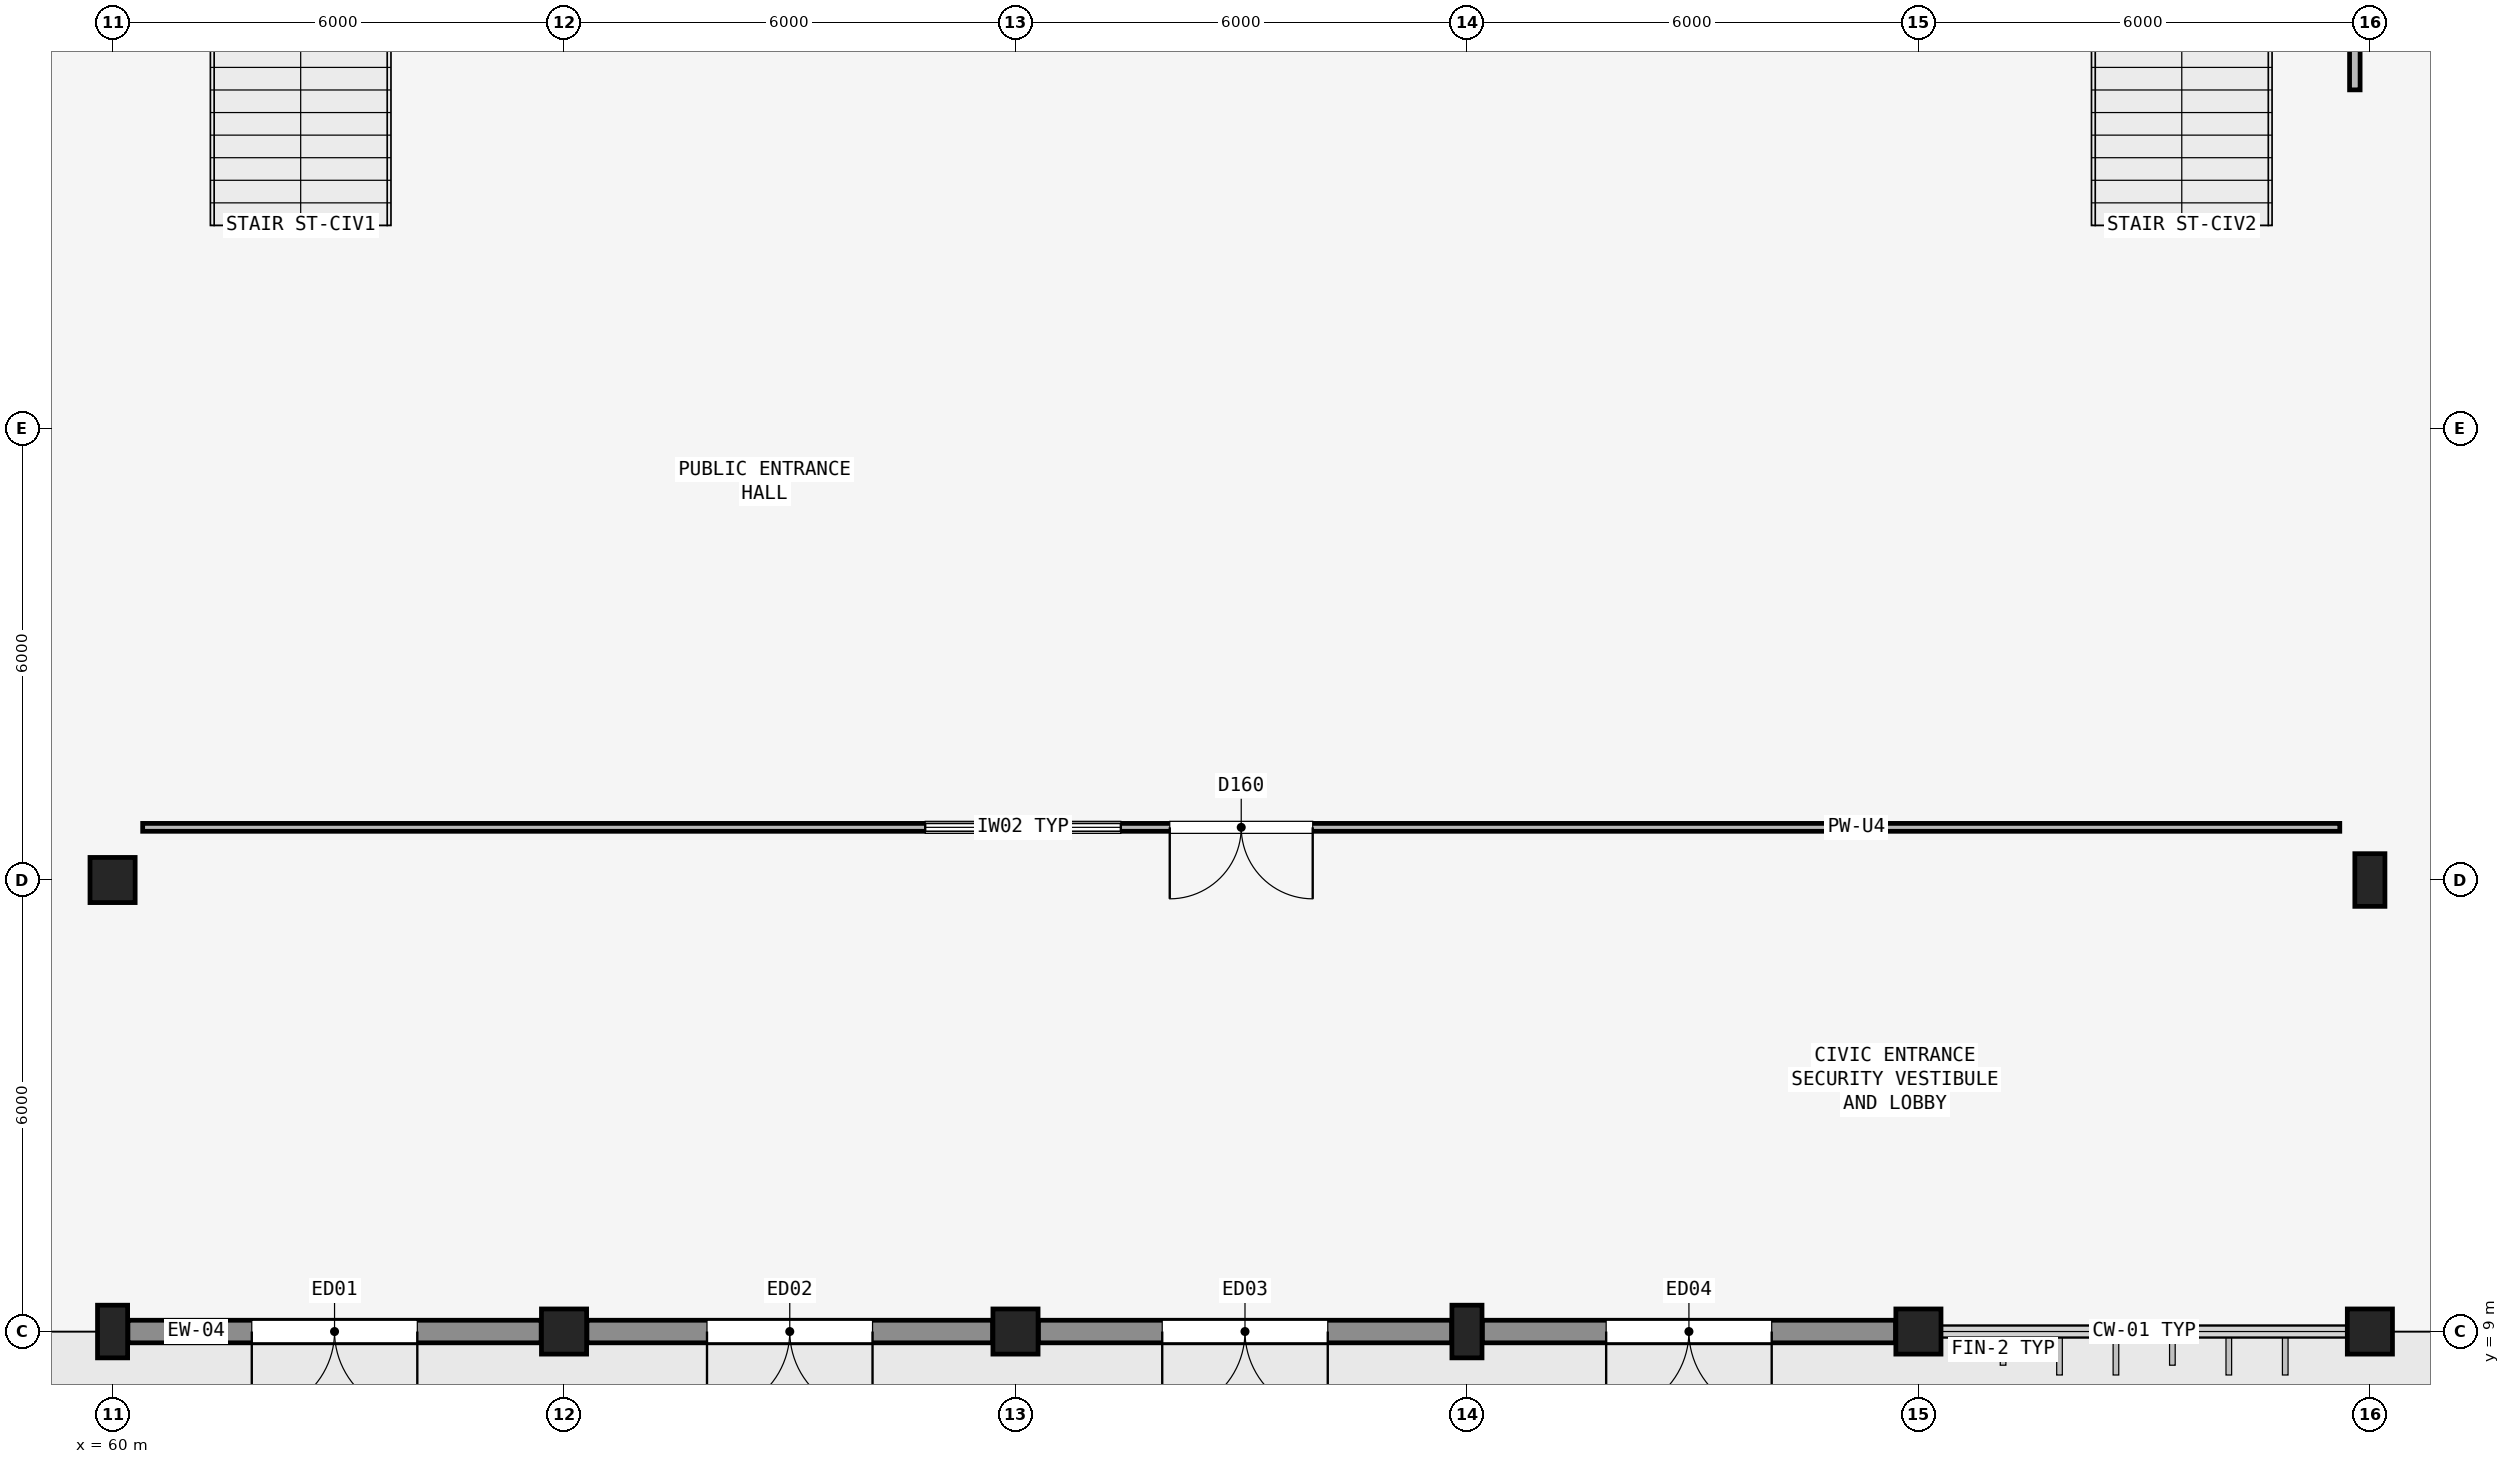
"""IFC4 building model, lengths in metres.
Left out: names, types, materials, properties, quantities, classifications, styles, units other than length and angle.
Written with IfcOpenShell. Run it as: python <this file> out.ifc"""

import sys

from ifc_helpers import new_model, si_unit, direction, frame, frame_2d, origin, origin_2d, place, context, subcontext, project, spatial, rectangle, extrude, element, fill, save


model = new_model("IFC4")
c1 = context("Model", 3, precision=1e-05, world=origin(), true_north=direction((0.0, 1.0)))
c2 = subcontext(c1, "Body", "Model", "MODEL_VIEW")
j1 = project(units=[si_unit("LENGTHUNIT", "METRE"), si_unit("PLANEANGLEUNIT", "RADIAN")], contexts=[c1])
p1 = place(None, origin())
s1 = spatial("IfcSite", under=j1, at=p1, CompositionType="ELEMENT")
p2 = place(p1, origin())
s2 = spatial("IfcBuilding", under=s1, at=p2, CompositionType="ELEMENT")
p3 = place(p2, origin())
s3 = spatial("IfcBuildingStorey", under=s2, at=p3, CompositionType="ELEMENT", Elevation=0.0)
p4 = place(p3, frame((60.0, 9.0, 0.0), z_axis=(0.0, 0.0, 1.0), x_axis=(1.0, 0.0, 0.0)))
e1 = element("IfcColumn", 1, at=p4, inside=s3, PredefinedType="COLUMN", context=c2, shape_type="SweptSolid", body=[
    extrude(rectangle(XDim=0.4, YDim=0.7, at=origin_2d()), origin(), (0.0, 0.0, 1.0), 4.8),
])
for number, where, z_axis, x_axis in (
    (2, (60.0, 15.0, 0.0), (0.0, 0.0, 1.0), (1.0, 0.0, 0.0)),
    (3, (66.0, 9.0, 0.0), (0.0, 0.0, 1.0), (1.0, 0.0, 0.0)),
    (4, (72.0, 9.0, 0.0), (0.0, 0.0, 1.0), (1.0, 0.0, 0.0)),
):
    element("IfcColumn", number, at=place(p3, frame(where, z_axis=z_axis, x_axis=x_axis)), inside=s3, PredefinedType="COLUMN", context=c2, shape_type="SweptSolid", body=[
        extrude(rectangle(XDim=0.6, YDim=0.6, at=origin_2d()), origin(), (0.0, 0.0, 1.0), 4.8),
    ])
p5 = place(p3, frame((78.0, 9.0, 0.0), z_axis=(0.0, 0.0, 1.0), x_axis=(1.0, 0.0, 0.0)))
e5 = element("IfcColumn", 5, at=p5, inside=s3, PredefinedType="COLUMN", context=c2, shape_type="SweptSolid", body=[
    extrude(rectangle(XDim=0.4, YDim=0.7, at=origin_2d()), origin(), (0.0, 0.0, 1.0), 4.8),
])
for number, where, z_axis, x_axis in (
    (6, (84.0, 9.0, 0.0), (0.0, 0.0, 1.0), (1.0, 0.0, 0.0)),
    (7, (90.0, 9.0, 0.0), (0.0, 0.0, 1.0), (1.0, 0.0, 0.0)),
):
    element("IfcColumn", number, at=place(p3, frame(where, z_axis=z_axis, x_axis=x_axis)), inside=s3, PredefinedType="COLUMN", context=c2, shape_type="SweptSolid", body=[
        extrude(rectangle(XDim=0.6, YDim=0.6, at=origin_2d()), origin(), (0.0, 0.0, 1.0), 4.8),
    ])
p6 = place(p3, frame((90.0, 15.0, 0.0), z_axis=(0.0, 0.0, 1.0), x_axis=(1.0, 0.0, 0.0)))
e8 = element("IfcColumn", 8, at=p6, inside=s3, PredefinedType="COLUMN", context=c2, shape_type="SweptSolid", body=[
    extrude(rectangle(XDim=0.4, YDim=0.7, at=origin_2d()), origin(), (0.0, 0.0, 1.0), 4.8),
])
p7 = place(p3, frame((60.204, 9.0, 0.0), z_axis=(0.0, 0.0, 1.0), x_axis=(1.0, 0.0, 0.0)))
e9 = element("IfcWall", 9, at=p7, inside=s3, PredefinedType="SOLIDWALL", context=c2, shape_type="SweptSolid", body=[
    extrude(rectangle(XDim=5.492, YDim=0.3, at=frame_2d((2.746, 0.0))), origin(), (0.0, 0.0, 1.0), 2.94),
])
p8 = place(p7, frame((1.646, 0.0, 0.0)))
e10 = element("IfcOpeningElement", 10, at=p8, cuts=e9, PredefinedType="OPENING", context=c2, shape_type="SweptSolid", body=[
    extrude(rectangle(XDim=2.2, YDim=2.5, at=frame_2d((1.1, 1.25))), frame((0.0, 0.16, 0.0), z_axis=(0.0, -1.0, 0.0), x_axis=(1.0, 0.0, 0.0)), (0.0, 0.0, 1.0), 0.32),
])
p9 = place(p3, frame((66.304, 9.0, 0.0), z_axis=(0.0, 0.0, 1.0), x_axis=(1.0, 0.0, 0.0)))
e11 = element("IfcWall", 11, at=p9, inside=s3, PredefinedType="SOLIDWALL", context=c2, shape_type="SweptSolid", body=[
    extrude(rectangle(XDim=5.392, YDim=0.3, at=frame_2d((2.696, 0.0))), origin(), (0.0, 0.0, 1.0), 2.99),
])
p10 = place(p9, frame((1.596, 0.0, 0.0)))
e12 = element("IfcOpeningElement", 12, at=p10, cuts=e11, PredefinedType="OPENING", context=c2, shape_type="SweptSolid", body=[
    extrude(rectangle(XDim=2.2, YDim=2.5, at=frame_2d((1.1, 1.25))), frame((0.0, 0.16, 0.0), z_axis=(0.0, -1.0, 0.0), x_axis=(1.0, 0.0, 0.0)), (0.0, 0.0, 1.0), 0.32),
])
p11 = place(p3, frame((72.304, 9.0, 0.0), z_axis=(0.0, 0.0, 1.0), x_axis=(1.0, 0.0, 0.0)))
e13 = element("IfcWall", 13, at=p11, inside=s3, PredefinedType="SOLIDWALL", context=c2, shape_type="SweptSolid", body=[
    extrude(rectangle(XDim=5.492, YDim=0.3, at=frame_2d((2.746, 0.0))), origin(), (0.0, 0.0, 1.0), 2.94),
])
p12 = place(p11, frame((1.646, 0.0, 0.0)))
e14 = element("IfcOpeningElement", 14, at=p12, cuts=e13, PredefinedType="OPENING", context=c2, shape_type="SweptSolid", body=[
    extrude(rectangle(XDim=2.2, YDim=2.5, at=frame_2d((1.1, 1.25))), frame((0.0, 0.16, 0.0), z_axis=(0.0, -1.0, 0.0), x_axis=(1.0, 0.0, 0.0)), (0.0, 0.0, 1.0), 0.32),
])
p13 = place(p3, frame((78.204, 9.0, 0.0), z_axis=(0.0, 0.0, 1.0), x_axis=(1.0, 0.0, 0.0)))
e15 = element("IfcWall", 15, at=p13, inside=s3, PredefinedType="SOLIDWALL", context=c2, shape_type="SweptSolid", body=[
    extrude(rectangle(XDim=5.492, YDim=0.3, at=frame_2d((2.746, 0.0))), origin(), (0.0, 0.0, 1.0), 2.94),
])
p14 = place(p13, frame((1.646, 0.0, 0.0)))
e16 = element("IfcOpeningElement", 16, at=p14, cuts=e15, PredefinedType="OPENING", context=c2, shape_type="SweptSolid", body=[
    extrude(rectangle(XDim=2.2, YDim=2.5, at=frame_2d((1.1, 1.25))), frame((0.0, 0.16, 0.0), z_axis=(0.0, -1.0, 0.0), x_axis=(1.0, 0.0, 0.0)), (0.0, 0.0, 1.0), 0.32),
])
p15 = place(p3, frame((89.6, 15.7, 0.0), z_axis=(0.0, 0.0, 1.0), x_axis=(-1.0, 0.0, 0.0)))
e17 = element("IfcWall", 17, at=p15, inside=s3, PredefinedType="PARTITIONING", context=c2, shape_type="SweptSolid", body=[
    extrude(rectangle(XDim=29.2, YDim=0.105, at=frame_2d((14.6, 0.0))), origin(), (0.0, 0.0, 1.0), 4.49),
])
p16 = place(p15, frame((13.65, 0.0, 0.0)))
e18 = element("IfcOpeningElement", 18, at=p16, cuts=e17, PredefinedType="OPENING", context=c2, shape_type="SweptSolid", body=[
    extrude(rectangle(XDim=1.9, YDim=2.3, at=frame_2d((0.95, 1.15))), frame((0.0, 0.062, 0.0), z_axis=(0.0, -1.0, 0.0), x_axis=(1.0, 0.0, 0.0)), (0.0, 0.0, 1.0), 0.125),
])
p17 = place(p15, frame((16.2, 0.0, 1.0)))
e19 = element("IfcOpeningElement", 19, at=p17, cuts=e17, PredefinedType="OPENING", context=c2, shape_type="SweptSolid", body=[
    extrude(rectangle(XDim=2.6, YDim=1.2, at=frame_2d((1.3, 0.6))), frame((0.0, 0.062, 0.0), z_axis=(0.0, -1.0, 0.0), x_axis=(1.0, 0.0, 0.0)), (0.0, 0.0, 1.0), 0.125),
])
p18 = place(p3, frame((89.8, 38.4, 0.0), z_axis=(0.0, 0.0, 1.0), x_axis=(0.0, -1.0, 0.0)))
e20 = element("IfcWall", 20, at=p18, inside=s3, PredefinedType="PARTITIONING", context=c2, shape_type="SweptSolid", body=[
    extrude(rectangle(XDim=12.9, YDim=0.14, at=frame_2d((6.45, 0.0))), origin(), (0.0, 0.0, 1.0), 3.31),
])
p19 = place(p18, frame((5.95, 0.0, 0.0)))
e21 = element("IfcOpeningElement", 21, at=p19, cuts=e20, PredefinedType="OPENING", context=c2, shape_type="SweptSolid", body=[
    extrude(rectangle(XDim=1.9, YDim=2.3, at=frame_2d((0.95, 1.15))), frame((0.0, 0.08, 0.0), z_axis=(0.0, -1.0, 0.0), x_axis=(1.0, 0.0, 0.0)), (0.0, 0.0, 1.0), 0.16),
])
p20 = place(p18, frame((8.5, 0.0, 1.05)))
e22 = element("IfcOpeningElement", 22, at=p20, cuts=e20, PredefinedType="OPENING", context=c2, shape_type="SweptSolid", body=[
    extrude(rectangle(XDim=1.6, YDim=1.1, at=frame_2d((0.8, 0.55))), frame((0.0, 0.08, 0.0), z_axis=(0.0, -1.0, 0.0), x_axis=(1.0, 0.0, 0.0)), (0.0, 0.0, 1.0), 0.16),
])
p21 = place(p8, frame((2.2, 0.0, 0.0), z_axis=(0.0, 0.0, 1.0), x_axis=(-1.0, 0.0, 0.0)))
e23 = element("IfcDoor", 23, at=p21, inside=s3, OperationType="DOUBLE_DOOR_SINGLE_SWING", PredefinedType="DOOR", context=c2, shape_type="SweptSolid", body=[
    extrude(rectangle(XDim=2.2, YDim=2.5, at=frame_2d((1.1, 1.25))), frame((0.0, 0.025, 0.0), z_axis=(0.0, -1.0, 0.0), x_axis=(1.0, 0.0, 0.0)), (0.0, 0.0, 1.0), 0.05),
])
fill(e10, e23)
p22 = place(p10, frame((2.2, 0.0, 0.0), z_axis=(0.0, 0.0, 1.0), x_axis=(-1.0, 0.0, 0.0)))
e24 = element("IfcDoor", 24, at=p22, inside=s3, OperationType="DOUBLE_DOOR_SINGLE_SWING", PredefinedType="DOOR", context=c2, shape_type="SweptSolid", body=[
    extrude(rectangle(XDim=2.2, YDim=2.5, at=frame_2d((1.1, 1.25))), frame((0.0, 0.025, 0.0), z_axis=(0.0, -1.0, 0.0), x_axis=(1.0, 0.0, 0.0)), (0.0, 0.0, 1.0), 0.05),
])
fill(e12, e24)
p23 = place(p12, frame((2.2, 0.0, 0.0), z_axis=(0.0, 0.0, 1.0), x_axis=(-1.0, 0.0, 0.0)))
e25 = element("IfcDoor", 25, at=p23, inside=s3, OperationType="DOUBLE_DOOR_SINGLE_SWING", PredefinedType="DOOR", context=c2, shape_type="SweptSolid", body=[
    extrude(rectangle(XDim=2.2, YDim=2.5, at=frame_2d((1.1, 1.25))), frame((0.0, 0.025, 0.0), z_axis=(0.0, -1.0, 0.0), x_axis=(1.0, 0.0, 0.0)), (0.0, 0.0, 1.0), 0.05),
])
fill(e14, e25)
p24 = place(p14, frame((2.2, 0.0, 0.0), z_axis=(0.0, 0.0, 1.0), x_axis=(-1.0, 0.0, 0.0)))
e26 = element("IfcDoor", 26, at=p24, inside=s3, OperationType="DOUBLE_DOOR_SINGLE_SWING", PredefinedType="DOOR", context=c2, shape_type="SweptSolid", body=[
    extrude(rectangle(XDim=2.2, YDim=2.5, at=frame_2d((1.1, 1.25))), frame((0.0, 0.025, 0.0), z_axis=(0.0, -1.0, 0.0), x_axis=(1.0, 0.0, 0.0)), (0.0, 0.0, 1.0), 0.05),
])
fill(e16, e26)
p25 = place(p16, origin())
e27 = element("IfcDoor", 27, at=p25, inside=s3, OperationType="DOUBLE_DOOR_SINGLE_SWING", PredefinedType="DOOR", context=c2, shape_type="SweptSolid", body=[
    extrude(rectangle(XDim=1.9, YDim=2.3, at=frame_2d((0.95, 1.15))), frame((0.0, 0.025, 0.0), z_axis=(0.0, -1.0, 0.0), x_axis=(1.0, 0.0, 0.0)), (0.0, 0.0, 1.0), 0.05),
])
fill(e18, e27)
p26 = place(p17, origin())
e28 = element("IfcWindow", 28, at=p26, inside=s3, PartitioningType="SINGLE_PANEL", PredefinedType="WINDOW", context=c2, shape_type="SweptSolid", body=[
    extrude(rectangle(XDim=2.6, YDim=1.2, at=frame_2d((1.3, 0.6))), frame((0.0, 0.03, 0.0), z_axis=(0.0, -1.0, 0.0), x_axis=(1.0, 0.0, 0.0)), (0.0, 0.0, 1.0), 0.06),
])
fill(e19, e28)
save(model, sys.argv[1])
